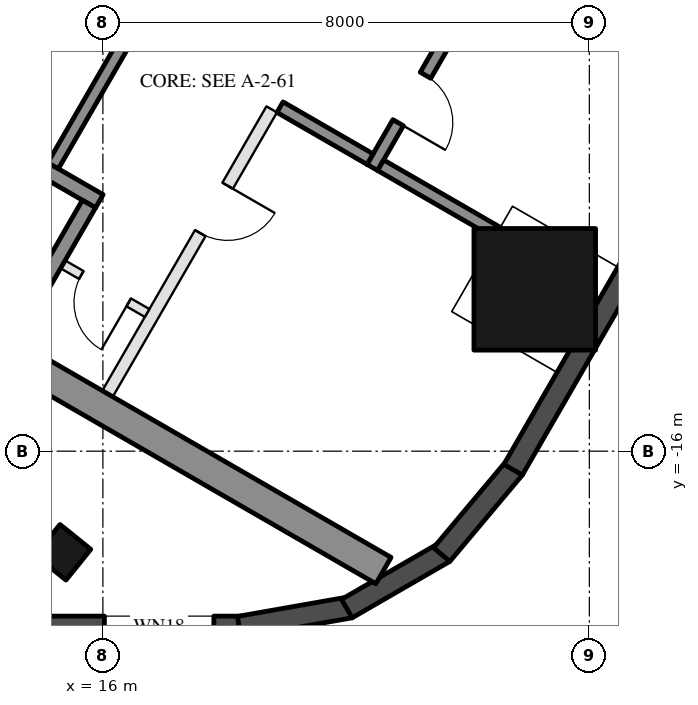
"""IFC4 building model, lengths in metres.
Left out: names, types, materials, properties, quantities, classifications, styles, units other than length and angle.
Written with IfcOpenShell. Run it as: python <this file> out.ifc"""

import sys

from ifc_helpers import new_model, si_unit, direction, frame, frame_2d, origin, origin_2d, place, context, subcontext, project, spatial, rectangle, hollow_rectangle, extrude, boolean, halfspace, element, fill, save


model = new_model("IFC4")
c1 = context("Model", 3, precision=1e-05, world=origin(), true_north=direction((0.0, 1.0)))
c2 = subcontext(c1, "Body", "Model", "MODEL_VIEW")
j1 = project(units=[si_unit("LENGTHUNIT", "METRE"), si_unit("PLANEANGLEUNIT", "RADIAN")], contexts=[c1])
p1 = place(None, origin())
s1 = spatial("IfcSite", under=j1, at=p1, CompositionType="ELEMENT")
p2 = place(p1, origin())
s2 = spatial("IfcBuilding", under=s1, at=p2, CompositionType="ELEMENT")
p3 = place(p2, frame((0.0, 0.0, 265.2)))
s3 = spatial("IfcBuildingStorey", under=s2, at=p3, CompositionType="ELEMENT", Elevation=265.2)
p4 = place(p3, frame((15.344, -17.663, 0.0), z_axis=(-0.121006106938, 0.150399778714, 0.981191840899), x_axis=(0.992606962496, 0.008942251163, 0.121043191254)))
e1 = element("IfcColumn", 1, at=p4, inside=s3, PredefinedType="COLUMN", context=c2, shape_type="SweptSolid", body=[
    boolean("DIFFERENCE", boolean("DIFFERENCE", extrude(hollow_rectangle(XDim=0.65, YDim=0.65, WallThickness=0.03, at=origin_2d()), origin(), (0.0, 0.0, 1.0), 3.771), halfspace(frame((0.0, 0.0, 0.047), z_axis=(0.0, 0.0, 1.0), x_axis=(1.0, 0.0, 0.0)), True)), halfspace(frame((0.0, 0.0, 3.724), z_axis=(0.0, 0.0, 1.0), x_axis=(1.0, 0.0, 0.0)), False)),
])
p5 = place(p3, frame((23.102, -13.338, 0.0), z_axis=(-0.190346159062, 0.109881938965, 0.975548204457), x_axis=(0.499994868029, 0.866028366632, 1.1507946e-05)))
e2 = element("IfcColumn", 2, at=p5, inside=s3, PredefinedType="COLUMN", context=c2, shape_type="SweptSolid", body=[
    boolean("DIFFERENCE", boolean("DIFFERENCE", extrude(hollow_rectangle(XDim=2.0, YDim=2.0, WallThickness=0.05, at=origin_2d()), origin(), (0.0, 0.0, 1.0), 3.793), halfspace(frame((0.0, 0.0, 0.113), z_axis=(0.0, 0.0, 1.0), x_axis=(1.0, 0.0, 0.0)), True)), halfspace(frame((0.0, 0.0, 3.679), z_axis=(0.0, 0.0, 1.0), x_axis=(1.0, 0.0, 0.0)), False)),
])
p6 = place(p3, frame((14.444, -18.888, 0.0), z_axis=(0.0, 0.0, 1.0), x_axis=(1.0, 0.0, 0.0)))
e3 = element("IfcWall", 3, at=p6, inside=s3, PredefinedType="SOLIDWALL", context=c2, shape_type="SweptSolid", body=[
    extrude(rectangle(XDim=3.829, YDim=0.35, at=frame_2d((1.914, 0.0))), origin(), (0.0, 0.0, 1.0), 3.55),
])
p7 = place(p6, frame((1.581, 0.0, 0.3)))
e4 = element("IfcOpeningElement", 4, at=p7, cuts=e3, PredefinedType="OPENING", context=c2, shape_type="SweptSolid", body=[
    extrude(rectangle(XDim=1.8, YDim=2.65, at=frame_2d((0.9, 1.325))), frame((0.0, 0.185, 0.0), z_axis=(0.0, -1.0, 0.0), x_axis=(1.0, 0.0, 0.0)), (0.0, 0.0, 1.0), 0.37),
])
p8 = place(p3, frame((18.242, -18.891, 0.0), z_axis=(0.0, 0.0, 1.0), x_axis=(0.984791508075, 0.173740282098, 0.0)))
e5 = element("IfcWall", 5, at=p8, inside=s3, PredefinedType="SOLIDWALL", context=c2, shape_type="SweptSolid", body=[
    extrude(rectangle(XDim=1.855, YDim=0.35, at=frame_2d((0.927, 0.0))), origin(), (0.0, 0.0, 1.0), 3.55),
])
for number, where, z_axis, x_axis in (
    (6, (20.011, -18.589, 0.0), (0.0, 0.0, 1.0), (0.866, 0.5, 0.0)),
    (7, (21.572, -17.701, 0.0), (0.0, 0.0, 1.0), (0.643, 0.766, 0.0)),
):
    element("IfcWall", number, at=place(p3, frame(where, z_axis=z_axis, x_axis=x_axis)), inside=s3, PredefinedType="SOLIDWALL", context=c2, shape_type="SweptSolid", body=[
        extrude(rectangle(XDim=1.855, YDim=0.35, at=frame_2d((0.927, 0.0))), origin(), (0.0, 0.0, 1.0), 3.55),
    ])
p9 = place(p3, frame((22.746, -16.305, 0.0), z_axis=(0.0, 0.0, 1.0), x_axis=(0.500028854569, 0.86600874395, 0.0)))
e8 = element("IfcWall", 8, at=p9, inside=s3, PredefinedType="SOLIDWALL", context=c2, shape_type="SweptSolid", body=[
    extrude(rectangle(XDim=5.495, YDim=0.35, at=frame_2d((2.748, 0.0))), origin(), (0.0, 0.0, 1.0), 3.55),
])
p10 = place(p3, frame((8.547, -10.997, 0.0), z_axis=(0.0, 0.0, 1.0), x_axis=(0.86602744543, -0.49999646375, 0.0)))
e9 = element("IfcWall", 9, at=p10, inside=s3, PredefinedType="SHEAR", context=c2, shape_type="SweptSolid", body=[
    extrude(rectangle(XDim=13.934, YDim=0.5, at=frame_2d((6.967, 0.0))), origin(), (0.0, 0.0, 1.0), 3.5),
])
p11 = place(p3, frame((10.356, -8.664, 0.0), z_axis=(0.0, 0.0, 1.0), x_axis=(0.866028629588, -0.499994412703, 0.0)))
e10 = element("IfcWall", 10, at=p11, inside=s3, PredefinedType="SHEAR", context=c2, shape_type="SweptSolid", body=[
    extrude(rectangle(XDim=6.45, YDim=0.25, at=frame_2d((3.225, 0.0))), origin(), (0.0, 0.0, 1.0), 3.5),
])
p12 = place(p11, frame((0.3, 0.0, 0.0)))
e11 = element("IfcOpeningElement", 11, at=p12, cuts=e10, PredefinedType="OPENING", context=c2, shape_type="SweptSolid", body=[
    extrude(rectangle(XDim=1.0, YDim=2.1, at=frame_2d((0.5, 1.05))), frame((0.0, 0.135, 0.0), z_axis=(0.0, -1.0, 0.0), x_axis=(1.0, 0.0, 0.0)), (0.0, 0.0, 1.0), 0.27),
])
p13 = place(p3, frame((14.496, -14.143, 0.0), z_axis=(0.0, 0.0, 1.0), x_axis=(0.500062241894, 0.865989465428, 0.0)))
e12 = element("IfcWall", 12, at=p13, inside=s3, PredefinedType="SHEAR", context=c2, shape_type="SweptSolid", body=[
    extrude(rectangle(XDim=2.55, YDim=0.25, at=frame_2d((1.275, 0.0))), origin(), (0.0, 0.0, 1.0), 3.5),
])
p14 = place(p3, frame((15.181, -11.305, 0.0), z_axis=(0.0, 0.0, 1.0), x_axis=(0.49994636267, 0.866056369097, 0.0)))
e13 = element("IfcWall", 13, at=p14, inside=s3, PredefinedType="SHEAR", context=c2, shape_type="SweptSolid", body=[
    extrude(rectangle(XDim=2.8, YDim=0.2, at=frame_2d((1.4, 0.0))), origin(), (0.0, 0.0, 1.0), 3.5),
])
p15 = place(p3, frame((20.43, -11.333, 0.0), z_axis=(0.0, 0.0, 1.0), x_axis=(0.500001309137, 0.866024647952, 0.0)))
e14 = element("IfcWall", 14, at=p15, inside=s3, PredefinedType="SHEAR", context=c2, shape_type="SweptSolid", body=[
    extrude(rectangle(XDim=2.4, YDim=0.2, at=frame_2d((1.2, 0.0))), origin(), (0.0, 0.0, 1.0), 3.5),
])
p16 = place(p15, frame((0.85, 0.0, 0.0)))
e15 = element("IfcOpeningElement", 15, at=p16, cuts=e14, PredefinedType="OPENING", context=c2, shape_type="SweptSolid", body=[
    extrude(rectangle(XDim=0.9, YDim=2.1, at=frame_2d((0.45, 1.05))), frame((0.0, 0.11, 0.0), z_axis=(0.0, -1.0, 0.0), x_axis=(1.0, 0.0, 0.0)), (0.0, 0.0, 1.0), 0.22),
])
p17 = place(p3, frame((18.913, -10.342, 0.0), z_axis=(0.0, 0.0, 1.0), x_axis=(0.866038183914, -0.499977863513, 0.0)))
e16 = element("IfcWall", 16, at=p17, inside=s3, PredefinedType="SHEAR", context=c2, shape_type="SweptSolid", body=[
    extrude(rectangle(XDim=1.71, YDim=0.2, at=frame_2d((0.855, 0.0))), origin(), (0.0, 0.0, 1.0), 3.5),
])
p18 = place(p3, frame((20.567, -11.297, 0.0), z_axis=(0.0, 0.0, 1.0), x_axis=(0.866079196458, -0.49990681678, 0.0)))
e17 = element("IfcWall", 17, at=p18, inside=s3, PredefinedType="SHEAR", context=c2, shape_type="SweptSolid", body=[
    extrude(rectangle(XDim=2.216, YDim=0.2, at=frame_2d((1.108, 0.0))), origin(), (0.0, 0.0, 1.0), 3.5),
])
p19 = place(p3, frame((16.076, -15.055, 0.0), z_axis=(0.0, 0.0, 1.0), x_axis=(0.499995103361, 0.866028230842, 0.0)))
e18 = element("IfcWall", 18, at=p19, inside=s3, PredefinedType="PARTITIONING", context=c2, shape_type="SweptSolid", body=[
    extrude(rectangle(XDim=5.4, YDim=0.2, at=frame_2d((2.7, 0.0))), origin(), (0.0, 0.0, 1.0), 3.5),
])
p20 = place(p19, frame((3.05, 0.0, 0.0)))
e19 = element("IfcOpeningElement", 19, at=p20, cuts=e18, PredefinedType="OPENING", context=c2, shape_type="SweptSolid", body=[
    extrude(rectangle(XDim=0.9, YDim=2.1, at=frame_2d((0.45, 1.05))), frame((0.0, 0.11, 0.0), z_axis=(0.0, -1.0, 0.0), x_axis=(1.0, 0.0, 0.0)), (0.0, 0.0, 1.0), 0.22),
])
p21 = place(p3, frame((15.342, -12.928, 0.0), z_axis=(0.0, 0.0, 1.0), x_axis=(0.865989903783, -0.500061482766, 0.0)))
e20 = element("IfcWall", 20, at=p21, inside=s3, PredefinedType="PARTITIONING", context=c2, shape_type="SweptSolid", body=[
    extrude(rectangle(XDim=1.6, YDim=0.15, at=frame_2d((0.8, 0.0))), origin(), (0.0, 0.0, 1.0), 3.5),
])
p22 = place(p21, frame((0.35, 0.0, 0.0)))
e21 = element("IfcOpeningElement", 21, at=p22, cuts=e20, PredefinedType="OPENING", context=c2, shape_type="SweptSolid", body=[
    extrude(rectangle(XDim=0.9, YDim=2.1, at=frame_2d((0.45, 1.05))), frame((0.0, 0.085, 0.0), z_axis=(0.0, -1.0, 0.0), x_axis=(1.0, 0.0, 0.0)), (0.0, 0.0, 1.0), 0.17),
])
p23 = place(p22, frame((0.9, 0.0, 0.0), z_axis=(0.0, 0.0, 1.0), x_axis=(-1.0, 0.0, 0.0)))
e22 = element("IfcDoor", 22, at=p23, inside=s3, OperationType="SINGLE_SWING_LEFT", PredefinedType="DOOR", context=c2, shape_type="SweptSolid", body=[
    extrude(rectangle(XDim=0.9, YDim=2.1, at=frame_2d((0.45, 1.05))), frame((0.0, 0.025, 0.0), z_axis=(0.0, -1.0, 0.0), x_axis=(1.0, 0.0, 0.0)), (0.0, 0.0, 1.0), 0.05),
])
fill(e21, e22)
p24 = place(p16, frame((0.9, 0.0, 0.0), z_axis=(0.0, 0.0, 1.0), x_axis=(-1.0, 0.0, 0.0)))
e23 = element("IfcDoor", 23, at=p24, inside=s3, OperationType="SINGLE_SWING_RIGHT", PredefinedType="DOOR", context=c2, shape_type="SweptSolid", body=[
    extrude(rectangle(XDim=0.9, YDim=2.1, at=frame_2d((0.45, 1.05))), frame((0.0, 0.025, 0.0), z_axis=(0.0, -1.0, 0.0), x_axis=(1.0, 0.0, 0.0)), (0.0, 0.0, 1.0), 0.05),
])
fill(e15, e23)
p25 = place(p20, frame((0.9, 0.0, 0.0), z_axis=(0.0, 0.0, 1.0), x_axis=(-1.0, 0.0, 0.0)))
e24 = element("IfcDoor", 24, at=p25, inside=s3, OperationType="SINGLE_SWING_LEFT", PredefinedType="DOOR", context=c2, shape_type="SweptSolid", body=[
    extrude(rectangle(XDim=0.9, YDim=2.1, at=frame_2d((0.45, 1.05))), frame((0.0, 0.025, 0.0), z_axis=(0.0, -1.0, 0.0), x_axis=(1.0, 0.0, 0.0)), (0.0, 0.0, 1.0), 0.05),
])
fill(e19, e24)
save(model, sys.argv[1])
